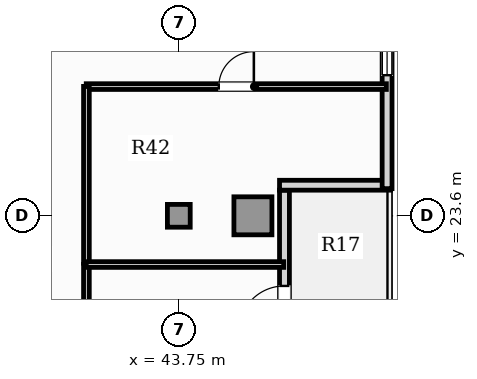
"""IFC4 building model, lengths in metres.
Left out: names, types, materials, properties, quantities, classifications, styles, units other than length and angle.
Written with IfcOpenShell. Run it as: python <this file> out.ifc"""

import sys

from ifc_helpers import new_model, si_unit, direction, frame, frame_2d, origin, origin_2d, place, context, subcontext, project, spatial, rectangle, hollow_rectangle, extrude, element, fill, save


model = new_model("IFC4")
c1 = context("Model", 3, precision=1e-05, world=origin(), true_north=direction((0.0, 1.0)))
c2 = subcontext(c1, "Body", "Model", "MODEL_VIEW")
j1 = project(units=[si_unit("LENGTHUNIT", "METRE"), si_unit("PLANEANGLEUNIT", "RADIAN")], contexts=[c1])
p1 = place(None, origin())
s1 = spatial("IfcSite", under=j1, at=p1, CompositionType="ELEMENT")
p2 = place(p1, origin())
s2 = spatial("IfcBuilding", under=s1, at=p2, CompositionType="ELEMENT")
p3 = place(p2, frame((0.0, 0.0, 268.3)))
s3 = spatial("IfcBuildingStorey", under=s2, at=p3, CompositionType="ELEMENT", Elevation=268.3)
p4 = place(p3, frame((45.7, 23.6, 0.0), z_axis=(0.0, 0.0, 1.0), x_axis=(1.0, 0.0, 0.0)))
e1 = element("IfcColumn", 1, at=p4, inside=s3, PredefinedType="USERDEFINED", context=c2, shape_type="SweptSolid", body=[
    extrude(hollow_rectangle(XDim=1.0, YDim=1.0, WallThickness=0.06, at=origin_2d()), origin(), (0.0, 0.0, 1.0), 3.85),
])
p5 = place(p3, frame((43.75, 23.6, 0.0), z_axis=(0.0, 0.0, 1.0), x_axis=(1.0, 0.0, 0.0)))
e2 = element("IfcColumn", 2, at=p5, inside=s3, PredefinedType="COLUMN", context=c2, shape_type="SweptSolid", body=[
    extrude(rectangle(XDim=0.6, YDim=0.6, at=origin_2d()), origin(), (0.0, 0.0, 1.0), 3.85),
])
p6 = place(p3, frame((46.53, 19.475, 0.0), z_axis=(0.0, 0.0, 1.0), x_axis=(0.0, 1.0, 0.0)))
e3 = element("IfcWall", 3, at=p6, inside=s3, PredefinedType="SOLIDWALL", context=c2, shape_type="SweptSolid", body=[
    extrude(rectangle(XDim=4.8, YDim=0.26, at=frame_2d((2.4, 0.0))), origin(), (0.0, 0.0, 1.0), 3.19),
])
p7 = place(p6, frame((1.08, 0.0, 0.0)))
e4 = element("IfcOpeningElement", 4, at=p7, cuts=e3, PredefinedType="OPENING", context=c2, shape_type="SweptSolid", body=[
    extrude(rectangle(XDim=1.2, YDim=2.2, at=frame_2d((0.6, 1.1))), frame((0.0, 0.14, 0.0), z_axis=(0.0, -1.0, 0.0), x_axis=(1.0, 0.0, 0.0)), (0.0, 0.0, 1.0), 0.28),
])
p8 = place(p3, frame((46.4, 24.405, 0.0), z_axis=(0.0, 0.0, 1.0), x_axis=(1.0, 0.0, 0.0)))
e5 = element("IfcWall", 5, at=p8, inside=s3, PredefinedType="SOLIDWALL", context=c2, shape_type="SweptSolid", body=[
    extrude(rectangle(XDim=2.92, YDim=0.26, at=frame_2d((1.46, 0.0))), origin(), (0.0, 0.0, 1.0), 3.65),
])
p9 = place(p3, frame((49.23, 24.315, 0.0), z_axis=(0.0, 0.0, 1.0), x_axis=(0.0, 1.0, 0.0)))
e6 = element("IfcWall", 6, at=p9, inside=s3, PredefinedType="SOLIDWALL", context=c2, shape_type="SweptSolid", body=[
    extrude(rectangle(XDim=7.795, YDim=0.26, at=frame_2d((3.897, 0.0))), origin(), (0.0, 0.0, 1.0), 3.65),
])
p10 = place(p9, frame((2.985, 0.0, 0.95)))
e7 = element("IfcOpeningElement", 7, at=p10, cuts=e6, PredefinedType="OPENING", context=c2, shape_type="SweptSolid", body=[
    extrude(rectangle(XDim=0.9, YDim=1.5, at=frame_2d((0.45, 0.75))), frame((0.0, 0.14, 0.0), z_axis=(0.0, -1.0, 0.0), x_axis=(1.0, 0.0, 0.0)), (0.0, 0.0, 1.0), 0.28),
])
p11 = place(p9, frame((4.5, 0.0, 0.88)))
e8 = element("IfcOpeningElement", 8, at=p11, cuts=e6, PredefinedType="OPENING", context=c2, shape_type="SweptSolid", body=[
    extrude(rectangle(XDim=1.65, YDim=2.0, at=frame_2d((0.825, 1.0))), frame((0.0, 0.14, 0.0), z_axis=(0.0, -1.0, 0.0), x_axis=(1.0, 0.0, 0.0)), (0.0, 0.0, 1.0), 0.28),
])
p12 = place(p3, frame((41.319, 18.596, 0.0), z_axis=(0.0, 0.0, 1.0), x_axis=(0.0, 1.0, 0.0)))
e9 = element("IfcWall", 9, at=p12, inside=s3, PredefinedType="PARTITIONING", context=c2, shape_type="SweptSolid", body=[
    extrude(rectangle(XDim=3.727, YDim=0.15, at=frame_2d((1.863, 0.0))), origin(), (0.0, 0.0, 1.0), 3.65),
])
p13 = place(p12, frame((1.403, 0.0, 0.0)))
e10 = element("IfcOpeningElement", 10, at=p13, cuts=e9, PredefinedType="OPENING", context=c2, shape_type="SweptSolid", body=[
    extrude(rectangle(XDim=0.92, YDim=2.1, at=frame_2d((0.46, 1.05))), frame((0.0, 0.085, 0.0), z_axis=(0.0, -1.0, 0.0), x_axis=(1.0, 0.0, 0.0)), (0.0, 0.0, 1.0), 0.17),
])
p14 = place(p3, frame((41.314, 27.0, 0.0), z_axis=(0.0, 0.0, 1.0), x_axis=(1.0, 0.0, 0.0)))
e11 = element("IfcWall", 11, at=p14, inside=s3, PredefinedType="PARTITIONING", context=c2, shape_type="SweptSolid", body=[
    extrude(rectangle(XDim=7.897, YDim=0.15, at=frame_2d((3.948, 0.0))), origin(), (0.0, 0.0, 1.0), 3.65),
])
p15 = place(p14, frame((3.488, 0.0, 0.0)))
e12 = element("IfcOpeningElement", 12, at=p15, cuts=e11, PredefinedType="OPENING", context=c2, shape_type="SweptSolid", body=[
    extrude(rectangle(XDim=0.92, YDim=2.1, at=frame_2d((0.46, 1.05))), frame((0.0, 0.085, 0.0), z_axis=(0.0, -1.0, 0.0), x_axis=(1.0, 0.0, 0.0)), (0.0, 0.0, 1.0), 0.17),
])
p16 = place(p3, frame((41.319, 22.353, 0.0), z_axis=(0.0, 0.0, 1.0), x_axis=(0.0, 1.0, 0.0)))
e13 = element("IfcWall", 13, at=p16, inside=s3, PredefinedType="PARTITIONING", context=c2, shape_type="SweptSolid", body=[
    extrude(rectangle(XDim=4.652, YDim=0.15, at=frame_2d((2.326, 0.0))), origin(), (0.0, 0.0, 1.0), 3.65),
])
p17 = place(p3, frame((41.314, 22.318, 0.0), z_axis=(0.0, 0.0, 1.0), x_axis=(1.0, 0.0, 0.0)))
e14 = element("IfcWall", 14, at=p17, inside=s3, PredefinedType="PARTITIONING", context=c2, shape_type="SweptSolid", body=[
    extrude(rectangle(XDim=5.197, YDim=0.15, at=frame_2d((2.598, 0.0))), origin(), (0.0, 0.0, 1.0), 3.65),
])
p18 = place(p7, frame((1.2, 0.0, 0.0), z_axis=(0.0, 0.0, 1.0), x_axis=(-1.0, 0.0, 0.0)))
e15 = element("IfcDoor", 15, at=p18, inside=s3, OperationType="SINGLE_SWING_RIGHT", PredefinedType="DOOR", context=c2, shape_type="SweptSolid", body=[
    extrude(rectangle(XDim=1.2, YDim=2.2, at=frame_2d((0.6, 1.1))), frame((0.0, 0.025, 0.0), z_axis=(0.0, -1.0, 0.0), x_axis=(1.0, 0.0, 0.0)), (0.0, 0.0, 1.0), 0.05),
])
fill(e4, e15)
p19 = place(p10, origin())
e16 = element("IfcWindow", 16, at=p19, inside=s3, PartitioningType="SINGLE_PANEL", PredefinedType="WINDOW", context=c2, shape_type="SweptSolid", body=[
    extrude(rectangle(XDim=0.9, YDim=1.5, at=frame_2d((0.45, 0.75))), frame((0.0, 0.03, 0.0), z_axis=(0.0, -1.0, 0.0), x_axis=(1.0, 0.0, 0.0)), (0.0, 0.0, 1.0), 0.06),
])
fill(e7, e16)
p20 = place(p15, origin())
e17 = element("IfcDoor", 17, at=p20, inside=s3, OperationType="SINGLE_SWING_RIGHT", PredefinedType="DOOR", context=c2, shape_type="SweptSolid", body=[
    extrude(rectangle(XDim=0.92, YDim=2.1, at=frame_2d((0.46, 1.05))), frame((0.0, 0.025, 0.0), z_axis=(0.0, -1.0, 0.0), x_axis=(1.0, 0.0, 0.0)), (0.0, 0.0, 1.0), 0.05),
])
fill(e12, e17)
save(model, sys.argv[1])
